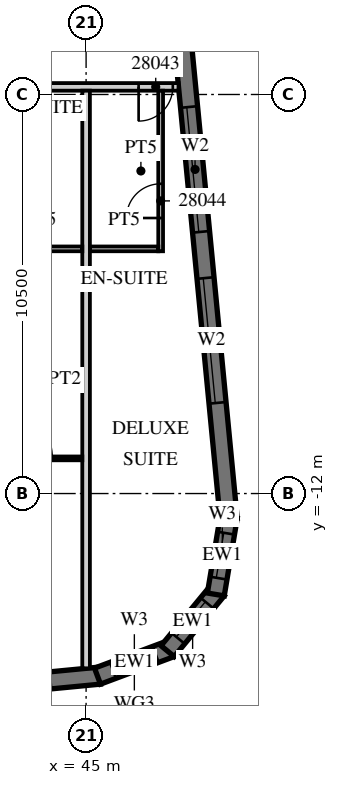
"""IFC4 building model, lengths in metres.
Left out: names, types, materials, properties, quantities, classifications, styles, units other than length and angle.
Written with IfcOpenShell. Run it as: python <this file> out.ifc"""

import sys

from ifc_helpers import new_model, si_unit, direction, frame, frame_2d, origin, place, context, subcontext, project, spatial, polyline, rectangle, outline, extrude, element, fill, save


model = new_model("IFC4")
c1 = context("Model", 3, precision=1e-05, world=origin(), true_north=direction((0.0, 1.0)))
c2 = subcontext(c1, "Body", "Model", "MODEL_VIEW")
j1 = project(units=[si_unit("LENGTHUNIT", "METRE"), si_unit("PLANEANGLEUNIT", "RADIAN")], contexts=[c1])
p1 = place(None, origin())
s1 = spatial("IfcSite", under=j1, at=p1, CompositionType="ELEMENT")
p2 = place(p1, origin())
s2 = spatial("IfcBuilding", under=s1, at=p2, CompositionType="ELEMENT")
p3 = place(p2, frame((0.0, 0.0, 127.3)))
s3 = spatial("IfcBuildingStorey", under=s2, at=p3, CompositionType="ELEMENT", Elevation=127.3)
p4 = place(p3, frame((-13.521, -22.46, 0.0), z_axis=(0.0, 0.0, 1.0), x_axis=(0.995396096335, 0.095846812164, 0.0)))
e1 = element("IfcWall", 1, at=p4, inside=s3, PredefinedType="SOLIDWALL", context=c2, shape_type="SweptSolid", body=[
    extrude(rectangle(XDim=59.151, YDim=0.45, at=frame_2d((29.575, 0.0))), origin(), (0.0, 0.0, 1.0), 3.02),
])
p5 = place(p4, frame((0.91, 0.0, 0.45)))
e2 = element("IfcOpeningElement", 2, at=p5, cuts=e1, PredefinedType="OPENING", context=c2, shape_type="SweptSolid", body=[
    extrude(rectangle(XDim=2.7, YDim=2.25, at=frame_2d((1.35, 1.125))), frame((0.0, 0.235, 0.0), z_axis=(0.0, -1.0, 0.0), x_axis=(1.0, 0.0, 0.0)), (0.0, 0.0, 1.0), 0.47),
])
p6 = place(p4, frame((5.431, 0.0, 0.45)))
e3 = element("IfcOpeningElement", 3, at=p6, cuts=e1, PredefinedType="OPENING", context=c2, shape_type="SweptSolid", body=[
    extrude(rectangle(XDim=2.7, YDim=2.25, at=frame_2d((1.35, 1.125))), frame((0.0, 0.235, 0.0), z_axis=(0.0, -1.0, 0.0), x_axis=(1.0, 0.0, 0.0)), (0.0, 0.0, 1.0), 0.47),
])
p7 = place(p4, frame((9.952, 0.0, 0.45)))
e4 = element("IfcOpeningElement", 4, at=p7, cuts=e1, PredefinedType="OPENING", context=c2, shape_type="SweptSolid", body=[
    extrude(rectangle(XDim=2.7, YDim=2.25, at=frame_2d((1.35, 1.125))), frame((0.0, 0.235, 0.0), z_axis=(0.0, -1.0, 0.0), x_axis=(1.0, 0.0, 0.0)), (0.0, 0.0, 1.0), 0.47),
])
p8 = place(p4, frame((14.473, 0.0, 0.45)))
e5 = element("IfcOpeningElement", 5, at=p8, cuts=e1, PredefinedType="OPENING", context=c2, shape_type="SweptSolid", body=[
    extrude(rectangle(XDim=2.7, YDim=2.25, at=frame_2d((1.35, 1.125))), frame((0.0, 0.235, 0.0), z_axis=(0.0, -1.0, 0.0), x_axis=(1.0, 0.0, 0.0)), (0.0, 0.0, 1.0), 0.47),
])
p9 = place(p4, frame((18.994, 0.0, 0.45)))
e6 = element("IfcOpeningElement", 6, at=p9, cuts=e1, PredefinedType="OPENING", context=c2, shape_type="SweptSolid", body=[
    extrude(rectangle(XDim=2.7, YDim=2.25, at=frame_2d((1.35, 1.125))), frame((0.0, 0.235, 0.0), z_axis=(0.0, -1.0, 0.0), x_axis=(1.0, 0.0, 0.0)), (0.0, 0.0, 1.0), 0.47),
])
p10 = place(p4, frame((23.514, 0.0, 0.45)))
e7 = element("IfcOpeningElement", 7, at=p10, cuts=e1, PredefinedType="OPENING", context=c2, shape_type="SweptSolid", body=[
    extrude(rectangle(XDim=2.7, YDim=2.25, at=frame_2d((1.35, 1.125))), frame((0.0, 0.235, 0.0), z_axis=(0.0, -1.0, 0.0), x_axis=(1.0, 0.0, 0.0)), (0.0, 0.0, 1.0), 0.47),
])
p11 = place(p4, frame((28.035, 0.0, 0.45)))
e8 = element("IfcOpeningElement", 8, at=p11, cuts=e1, PredefinedType="OPENING", context=c2, shape_type="SweptSolid", body=[
    extrude(rectangle(XDim=2.7, YDim=2.25, at=frame_2d((1.35, 1.125))), frame((0.0, 0.235, 0.0), z_axis=(0.0, -1.0, 0.0), x_axis=(1.0, 0.0, 0.0)), (0.0, 0.0, 1.0), 0.47),
])
p12 = place(p4, frame((32.556, 0.0, 0.45)))
e9 = element("IfcOpeningElement", 9, at=p12, cuts=e1, PredefinedType="OPENING", context=c2, shape_type="SweptSolid", body=[
    extrude(rectangle(XDim=2.7, YDim=2.25, at=frame_2d((1.35, 1.125))), frame((0.0, 0.235, 0.0), z_axis=(0.0, -1.0, 0.0), x_axis=(1.0, 0.0, 0.0)), (0.0, 0.0, 1.0), 0.47),
])
p13 = place(p4, frame((37.077, 0.0, 0.45)))
e10 = element("IfcOpeningElement", 10, at=p13, cuts=e1, PredefinedType="OPENING", context=c2, shape_type="SweptSolid", body=[
    extrude(rectangle(XDim=2.7, YDim=2.25, at=frame_2d((1.35, 1.125))), frame((0.0, 0.235, 0.0), z_axis=(0.0, -1.0, 0.0), x_axis=(1.0, 0.0, 0.0)), (0.0, 0.0, 1.0), 0.47),
])
p14 = place(p4, frame((41.598, 0.0, 0.45)))
e11 = element("IfcOpeningElement", 11, at=p14, cuts=e1, PredefinedType="OPENING", context=c2, shape_type="SweptSolid", body=[
    extrude(rectangle(XDim=2.7, YDim=2.25, at=frame_2d((1.35, 1.125))), frame((0.0, 0.235, 0.0), z_axis=(0.0, -1.0, 0.0), x_axis=(1.0, 0.0, 0.0)), (0.0, 0.0, 1.0), 0.47),
])
p15 = place(p4, frame((46.118, 0.0, 0.45)))
e12 = element("IfcOpeningElement", 12, at=p15, cuts=e1, PredefinedType="OPENING", context=c2, shape_type="SweptSolid", body=[
    extrude(rectangle(XDim=2.7, YDim=2.25, at=frame_2d((1.35, 1.125))), frame((0.0, 0.235, 0.0), z_axis=(0.0, -1.0, 0.0), x_axis=(1.0, 0.0, 0.0)), (0.0, 0.0, 1.0), 0.47),
])
p16 = place(p4, frame((50.639, 0.0, 0.45)))
e13 = element("IfcOpeningElement", 13, at=p16, cuts=e1, PredefinedType="OPENING", context=c2, shape_type="SweptSolid", body=[
    extrude(rectangle(XDim=2.7, YDim=2.25, at=frame_2d((1.35, 1.125))), frame((0.0, 0.235, 0.0), z_axis=(0.0, -1.0, 0.0), x_axis=(1.0, 0.0, 0.0)), (0.0, 0.0, 1.0), 0.47),
])
p17 = place(p4, frame((55.15, 0.0, 0.45)))
e14 = element("IfcOpeningElement", 14, at=p17, cuts=e1, PredefinedType="OPENING", context=c2, shape_type="SweptSolid", body=[
    extrude(rectangle(XDim=2.7, YDim=2.25, at=frame_2d((1.35, 1.125))), frame((0.0, 0.235, 0.0), z_axis=(0.0, -1.0, 0.0), x_axis=(1.0, 0.0, 0.0)), (0.0, 0.0, 1.0), 0.47),
])
p18 = place(p3, frame((45.3, -16.804, 0.0), z_axis=(0.0, 0.0, 1.0), x_axis=(0.936677599948, 0.350192909346, 0.0)))
e15 = element("IfcWall", 15, at=p18, inside=s3, PredefinedType="SOLIDWALL", context=c2, shape_type="SweptSolid", body=[
    extrude(outline(polyline([(0.0, -0.225), (2.071, -0.225), (1.95, 0.225), (0.121, 0.225), (0.0, -0.225)])), origin(), (0.0, 0.0, 1.0), 3.02),
])
p19 = place(p18, frame((0.435, 0.0, 0.45)))
e16 = element("IfcOpeningElement", 16, at=p19, cuts=e15, PredefinedType="OPENING", context=c2, shape_type="SweptSolid", body=[
    extrude(rectangle(XDim=1.2, YDim=2.25, at=frame_2d((0.6, 1.125))), frame((0.0, 0.235, 0.0), z_axis=(0.0, -1.0, 0.0), x_axis=(1.0, 0.0, 0.0)), (0.0, 0.0, 1.0), 0.47),
])
p20 = place(p3, frame((47.145, -16.147, 0.0), z_axis=(0.0, 0.0, 1.0), x_axis=(0.635988241739, 0.771698747161, 0.0)))
e17 = element("IfcWall", 17, at=p20, inside=s3, PredefinedType="SOLIDWALL", context=c2, shape_type="SweptSolid", body=[
    extrude(outline(polyline([(0.0, -0.225), (2.071, -0.225), (1.95, 0.225), (0.121, 0.225), (0.0, -0.225)])), origin(), (0.0, 0.0, 1.0), 3.02),
])
p21 = place(p20, frame((0.435, 0.0, 0.45)))
e18 = element("IfcOpeningElement", 18, at=p21, cuts=e17, PredefinedType="OPENING", context=c2, shape_type="SweptSolid", body=[
    extrude(rectangle(XDim=1.2, YDim=2.25, at=frame_2d((0.6, 1.125))), frame((0.0, 0.235, 0.0), z_axis=(0.0, -1.0, 0.0), x_axis=(1.0, 0.0, 0.0)), (0.0, 0.0, 1.0), 0.47),
])
p22 = place(p3, frame((48.413, -14.655, 0.0), z_axis=(0.0, 0.0, 1.0), x_axis=(0.165068144653, 0.986282164302, 0.0)))
e19 = element("IfcWall", 19, at=p22, inside=s3, PredefinedType="SOLIDWALL", context=c2, shape_type="SweptSolid", body=[
    extrude(outline(polyline([(0.0, -0.225), (2.071, -0.225), (1.95, 0.225), (0.121, 0.225), (0.0, -0.225)])), origin(), (0.0, 0.0, 1.0), 3.02),
])
p23 = place(p22, frame((0.435, 0.0, 0.45)))
e20 = element("IfcOpeningElement", 20, at=p23, cuts=e19, PredefinedType="OPENING", context=c2, shape_type="SweptSolid", body=[
    extrude(rectangle(XDim=1.2, YDim=2.25, at=frame_2d((0.6, 1.125))), frame((0.0, 0.235, 0.0), z_axis=(0.0, -1.0, 0.0), x_axis=(1.0, 0.0, 0.0)), (0.0, 0.0, 1.0), 0.47),
])
p24 = place(p3, frame((48.753, -12.672, 0.0), z_axis=(0.0, 0.0, 1.0), x_axis=(-0.095842661909, 0.995396495954, 0.0)))
e21 = element("IfcWall", 21, at=p24, inside=s3, PredefinedType="SOLIDWALL", context=c2, shape_type="SweptSolid", body=[
    extrude(rectangle(XDim=35.0, YDim=0.45, at=frame_2d((17.5, 0.0))), origin(), (0.0, 0.0, 1.0), 3.02),
])
p25 = place(p24, frame((3.072, 0.0, 0.45)))
e22 = element("IfcOpeningElement", 22, at=p25, cuts=e21, PredefinedType="OPENING", context=c2, shape_type="SweptSolid", body=[
    extrude(rectangle(XDim=3.3, YDim=2.25, at=frame_2d((1.65, 1.125))), frame((0.0, 0.235, 0.0), z_axis=(0.0, -1.0, 0.0), x_axis=(1.0, 0.0, 0.0)), (0.0, 0.0, 1.0), 0.47),
])
p26 = place(p24, frame((7.593, 0.0, 0.45)))
e23 = element("IfcOpeningElement", 23, at=p26, cuts=e21, PredefinedType="OPENING", context=c2, shape_type="SweptSolid", body=[
    extrude(rectangle(XDim=3.3, YDim=2.25, at=frame_2d((1.65, 1.125))), frame((0.0, 0.235, 0.0), z_axis=(0.0, -1.0, 0.0), x_axis=(1.0, 0.0, 0.0)), (0.0, 0.0, 1.0), 0.47),
])
p27 = place(p3, frame((-13.5, -1.3, 0.0), z_axis=(0.0, 0.0, 1.0), x_axis=(1.0, 0.0, 0.0)))
e24 = element("IfcWall", 24, at=p27, inside=s3, PredefinedType="PARTITIONING", context=c2, shape_type="SweptSolid", body=[
    extrude(rectangle(XDim=60.932, YDim=0.2, at=frame_2d((30.466, 0.0))), origin(), (0.0, 0.0, 1.0), 3.02),
])
p28 = place(p27, frame((2.925, 0.0, 0.0)))
e25 = element("IfcOpeningElement", 25, at=p28, cuts=e24, PredefinedType="OPENING", context=c2, shape_type="SweptSolid", body=[
    extrude(rectangle(XDim=1.0, YDim=2.1, at=frame_2d((0.5, 1.05))), frame((0.0, 0.11, 0.0), z_axis=(0.0, -1.0, 0.0), x_axis=(1.0, 0.0, 0.0)), (0.0, 0.0, 1.0), 0.22),
])
p29 = place(p27, frame((9.863, 0.0, 0.0)))
e26 = element("IfcOpeningElement", 26, at=p29, cuts=e24, PredefinedType="OPENING", context=c2, shape_type="SweptSolid", body=[
    extrude(rectangle(XDim=1.2, YDim=2.1, at=frame_2d((0.6, 1.05))), frame((0.0, 0.11, 0.0), z_axis=(0.0, -1.0, 0.0), x_axis=(1.0, 0.0, 0.0)), (0.0, 0.0, 1.0), 0.22),
])
p30 = place(p27, frame((15.938, 0.0, 0.0)))
e27 = element("IfcOpeningElement", 27, at=p30, cuts=e24, PredefinedType="OPENING", context=c2, shape_type="SweptSolid", body=[
    extrude(rectangle(XDim=1.2, YDim=2.1, at=frame_2d((0.6, 1.05))), frame((0.0, 0.11, 0.0), z_axis=(0.0, -1.0, 0.0), x_axis=(1.0, 0.0, 0.0)), (0.0, 0.0, 1.0), 0.22),
])
p31 = place(p27, frame((27.862, 0.0, 0.0)))
e28 = element("IfcOpeningElement", 28, at=p31, cuts=e24, PredefinedType="OPENING", context=c2, shape_type="SweptSolid", body=[
    extrude(rectangle(XDim=1.2, YDim=2.1, at=frame_2d((0.6, 1.05))), frame((0.0, 0.11, 0.0), z_axis=(0.0, -1.0, 0.0), x_axis=(1.0, 0.0, 0.0)), (0.0, 0.0, 1.0), 0.22),
])
p32 = place(p27, frame((34.45, 0.0, 0.0)))
e29 = element("IfcOpeningElement", 29, at=p32, cuts=e24, PredefinedType="OPENING", context=c2, shape_type="SweptSolid", body=[
    extrude(rectangle(XDim=1.0, YDim=2.1, at=frame_2d((0.5, 1.05))), frame((0.0, 0.11, 0.0), z_axis=(0.0, -1.0, 0.0), x_axis=(1.0, 0.0, 0.0)), (0.0, 0.0, 1.0), 0.22),
])
p33 = place(p27, frame((36.55, 0.0, 0.0)))
e30 = element("IfcOpeningElement", 30, at=p33, cuts=e24, PredefinedType="OPENING", context=c2, shape_type="SweptSolid", body=[
    extrude(rectangle(XDim=1.0, YDim=2.1, at=frame_2d((0.5, 1.05))), frame((0.0, 0.11, 0.0), z_axis=(0.0, -1.0, 0.0), x_axis=(1.0, 0.0, 0.0)), (0.0, 0.0, 1.0), 0.22),
])
p34 = place(p27, frame((41.075, 0.0, 0.0)))
e31 = element("IfcOpeningElement", 31, at=p34, cuts=e24, PredefinedType="OPENING", context=c2, shape_type="SweptSolid", body=[
    extrude(rectangle(XDim=1.0, YDim=2.1, at=frame_2d((0.5, 1.05))), frame((0.0, 0.11, 0.0), z_axis=(0.0, -1.0, 0.0), x_axis=(1.0, 0.0, 0.0)), (0.0, 0.0, 1.0), 0.22),
])
p35 = place(p27, frame((45.55, 0.0, 0.0)))
e32 = element("IfcOpeningElement", 32, at=p35, cuts=e24, PredefinedType="OPENING", context=c2, shape_type="SweptSolid", body=[
    extrude(rectangle(XDim=1.0, YDim=2.1, at=frame_2d((0.5, 1.05))), frame((0.0, 0.11, 0.0), z_axis=(0.0, -1.0, 0.0), x_axis=(1.0, 0.0, 0.0)), (0.0, 0.0, 1.0), 0.22),
])
p36 = place(p27, frame((50.075, 0.0, 0.0)))
e33 = element("IfcOpeningElement", 33, at=p36, cuts=e24, PredefinedType="OPENING", context=c2, shape_type="SweptSolid", body=[
    extrude(rectangle(XDim=1.0, YDim=2.1, at=frame_2d((0.5, 1.05))), frame((0.0, 0.11, 0.0), z_axis=(0.0, -1.0, 0.0), x_axis=(1.0, 0.0, 0.0)), (0.0, 0.0, 1.0), 0.22),
])
p37 = place(p27, frame((54.575, 0.0, 0.0)))
e34 = element("IfcOpeningElement", 34, at=p37, cuts=e24, PredefinedType="OPENING", context=c2, shape_type="SweptSolid", body=[
    extrude(rectangle(XDim=1.0, YDim=2.1, at=frame_2d((0.5, 1.05))), frame((0.0, 0.11, 0.0), z_axis=(0.0, -1.0, 0.0), x_axis=(1.0, 0.0, 0.0)), (0.0, 0.0, 1.0), 0.22),
])
p38 = place(p27, frame((59.882, 0.0, 0.0)))
e35 = element("IfcOpeningElement", 35, at=p38, cuts=e24, PredefinedType="OPENING", context=c2, shape_type="SweptSolid", body=[
    extrude(rectangle(XDim=0.9, YDim=2.1, at=frame_2d((0.45, 1.05))), frame((0.0, 0.11, 0.0), z_axis=(0.0, -1.0, 0.0), x_axis=(1.0, 0.0, 0.0)), (0.0, 0.0, 1.0), 0.22),
])
p39 = place(p3, frame((45.0, -16.599, 0.0), z_axis=(0.0, 0.0, 1.0), x_axis=(0.0, 1.0, 0.0)))
e36 = element("IfcWall", 36, at=p39, inside=s3, PredefinedType="PARTITIONING", context=c2, shape_type="SweptSolid", body=[
    extrude(rectangle(XDim=15.199, YDim=0.2, at=frame_2d((7.6, 0.0))), origin(), (0.0, 0.0, 1.0), 3.02),
])
p40 = place(p3, frame((42.65, -5.562, 0.0), z_axis=(0.0, 0.0, 1.0), x_axis=(1.0, 0.0, 0.0)))
e37 = element("IfcWall", 37, at=p40, inside=s3, PredefinedType="PARTITIONING", context=c2, shape_type="SweptSolid", body=[
    extrude(rectangle(XDim=2.25, YDim=0.125, at=frame_2d((1.125, 0.0))), origin(), (0.0, 0.0, 1.0), 3.02),
])
p41 = place(p3, frame((40.625, -11.075, 0.0), z_axis=(0.0, 0.0, 1.0), x_axis=(1.0, 0.0, 0.0)))
e38 = element("IfcWall", 38, at=p41, inside=s3, PredefinedType="PARTITIONING", context=c2, shape_type="SweptSolid", body=[
    extrude(rectangle(XDim=4.275, YDim=0.1, at=frame_2d((2.137, 0.0))), origin(), (0.0, 0.0, 1.0), 3.02),
])
p42 = place(p41, frame((1.988, 0.0, 0.0)))
e39 = element("IfcOpeningElement", 39, at=p42, cuts=e38, PredefinedType="OPENING", context=c2, shape_type="SweptSolid", body=[
    extrude(rectangle(XDim=1.5, YDim=2.1, at=frame_2d((0.75, 1.05))), frame((0.0, 0.06, 0.0), z_axis=(0.0, -1.0, 0.0), x_axis=(1.0, 0.0, 0.0)), (0.0, 0.0, 1.0), 0.12),
])
p43 = place(p3, frame((46.962, -5.625, 0.0), z_axis=(0.0, 0.0, 1.0), x_axis=(0.0, 1.0, 0.0)))
e40 = element("IfcWall", 40, at=p43, inside=s3, PredefinedType="PARTITIONING", context=c2, shape_type="SweptSolid", body=[
    extrude(rectangle(XDim=4.225, YDim=0.125, at=frame_2d((2.113, 0.0))), origin(), (0.0, 0.0, 1.0), 3.02),
])
p44 = place(p43, frame((0.875, 0.0, 0.0)))
e41 = element("IfcOpeningElement", 41, at=p44, cuts=e40, PredefinedType="OPENING", context=c2, shape_type="SweptSolid", body=[
    extrude(rectangle(XDim=0.9, YDim=2.1, at=frame_2d((0.45, 1.05))), frame((0.0, 0.073, 0.0), z_axis=(0.0, -1.0, 0.0), x_axis=(1.0, 0.0, 0.0)), (0.0, 0.0, 1.0), 0.145),
])
p45 = place(p3, frame((45.1, -5.562, 0.0), z_axis=(0.0, 0.0, 1.0), x_axis=(1.0, 0.0, 0.0)))
e42 = element("IfcWall", 42, at=p45, inside=s3, PredefinedType="PARTITIONING", context=c2, shape_type="SweptSolid", body=[
    extrude(rectangle(XDim=1.8, YDim=0.125, at=frame_2d((0.9, 0.0))), origin(), (0.0, 0.0, 1.0), 3.02),
])
p46 = place(p19, origin())
e43 = element("IfcWindow", 43, at=p46, inside=s3, PartitioningType="SINGLE_PANEL", PredefinedType="WINDOW", context=c2, shape_type="SweptSolid", body=[
    extrude(rectangle(XDim=1.2, YDim=2.25, at=frame_2d((0.6, 1.125))), frame((0.0, 0.09, 0.0), z_axis=(0.0, -1.0, 0.0), x_axis=(1.0, 0.0, 0.0)), (0.0, 0.0, 1.0), 0.06),
])
fill(e16, e43)
p47 = place(p21, origin())
e44 = element("IfcWindow", 44, at=p47, inside=s3, PartitioningType="SINGLE_PANEL", PredefinedType="WINDOW", context=c2, shape_type="SweptSolid", body=[
    extrude(rectangle(XDim=1.2, YDim=2.25, at=frame_2d((0.6, 1.125))), frame((0.0, 0.09, 0.0), z_axis=(0.0, -1.0, 0.0), x_axis=(1.0, 0.0, 0.0)), (0.0, 0.0, 1.0), 0.06),
])
fill(e18, e44)
p48 = place(p23, origin())
e45 = element("IfcWindow", 45, at=p48, inside=s3, PartitioningType="SINGLE_PANEL", PredefinedType="WINDOW", context=c2, shape_type="SweptSolid", body=[
    extrude(rectangle(XDim=1.2, YDim=2.25, at=frame_2d((0.6, 1.125))), frame((0.0, 0.09, 0.0), z_axis=(0.0, -1.0, 0.0), x_axis=(1.0, 0.0, 0.0)), (0.0, 0.0, 1.0), 0.06),
])
fill(e20, e45)
p49 = place(p25, origin())
e46 = element("IfcWindow", 46, at=p49, inside=s3, PartitioningType="SINGLE_PANEL", PredefinedType="WINDOW", context=c2, shape_type="SweptSolid", body=[
    extrude(rectangle(XDim=3.3, YDim=2.25, at=frame_2d((1.65, 1.125))), frame((0.0, 0.09, 0.0), z_axis=(0.0, -1.0, 0.0), x_axis=(1.0, 0.0, 0.0)), (0.0, 0.0, 1.0), 0.06),
])
fill(e22, e46)
p50 = place(p26, origin())
e47 = element("IfcWindow", 47, at=p50, inside=s3, PartitioningType="SINGLE_PANEL", PredefinedType="WINDOW", context=c2, shape_type="SweptSolid", body=[
    extrude(rectangle(XDim=3.3, YDim=2.25, at=frame_2d((1.65, 1.125))), frame((0.0, 0.09, 0.0), z_axis=(0.0, -1.0, 0.0), x_axis=(1.0, 0.0, 0.0)), (0.0, 0.0, 1.0), 0.06),
])
fill(e23, e47)
p51 = place(p42, origin())
e48 = element("IfcDoor", 48, at=p51, inside=s3, OperationType="SINGLE_SWING_LEFT", PredefinedType="DOOR", context=c2, shape_type="SweptSolid", body=[
    extrude(rectangle(XDim=1.5, YDim=2.1, at=frame_2d((0.75, 1.05))), frame((0.0, 0.025, 0.0), z_axis=(0.0, -1.0, 0.0), x_axis=(1.0, 0.0, 0.0)), (0.0, 0.0, 1.0), 0.05),
])
fill(e39, e48)
p52 = place(p38, origin())
e49 = element("IfcDoor", 49, at=p52, inside=s3, OperationType="SINGLE_SWING_LEFT", PredefinedType="DOOR", context=c2, shape_type="SweptSolid", body=[
    extrude(rectangle(XDim=0.9, YDim=2.1, at=frame_2d((0.45, 1.05))), frame((0.0, 0.025, 0.0), z_axis=(0.0, -1.0, 0.0), x_axis=(1.0, 0.0, 0.0)), (0.0, 0.0, 1.0), 0.05),
])
fill(e35, e49)
p53 = place(p44, origin())
e50 = element("IfcDoor", 50, at=p53, inside=s3, OperationType="SINGLE_SWING_LEFT", PredefinedType="DOOR", context=c2, shape_type="SweptSolid", body=[
    extrude(rectangle(XDim=0.9, YDim=2.1, at=frame_2d((0.45, 1.05))), frame((0.0, 0.025, 0.0), z_axis=(0.0, -1.0, 0.0), x_axis=(1.0, 0.0, 0.0)), (0.0, 0.0, 1.0), 0.05),
])
fill(e41, e50)
save(model, sys.argv[1])
